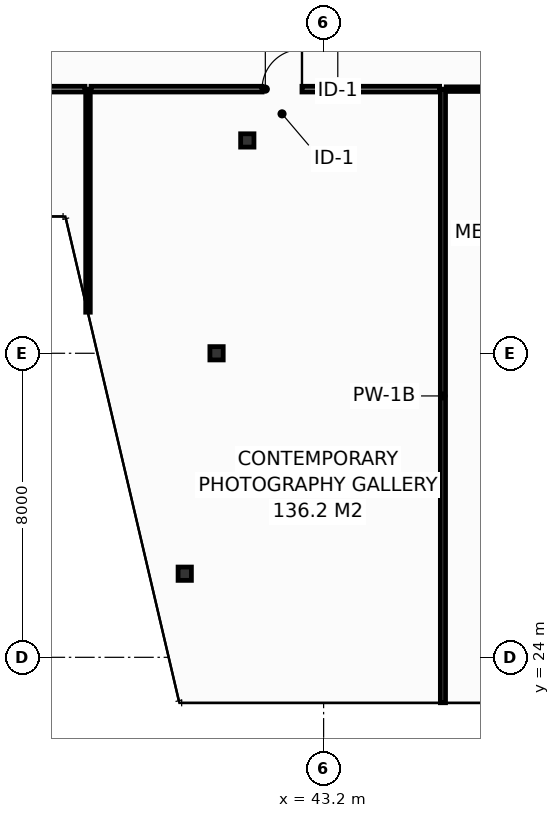
"""IFC4 building model, lengths in metres.
Left out: names, types, materials, properties, quantities, classifications, styles, units other than length and angle.
Written with IfcOpenShell. Run it as: python <this file> out.ifc"""

import sys

from ifc_helpers import new_model, si_unit, direction, frame, frame_2d, origin, origin_2d, place, context, subcontext, project, spatial, rectangle, hollow_rectangle, extrude, element, fill, save


model = new_model("IFC4")
c1 = context("Model", 3, precision=1e-05, world=origin(), true_north=direction((0.0, 1.0)))
c2 = subcontext(c1, "Body", "Model", "MODEL_VIEW")
j1 = project(units=[si_unit("LENGTHUNIT", "METRE"), si_unit("PLANEANGLEUNIT", "RADIAN")], contexts=[c1])
p1 = place(None, origin())
s1 = spatial("IfcSite", under=j1, at=p1, CompositionType="ELEMENT")
p2 = place(p1, origin())
s2 = spatial("IfcBuilding", under=s1, at=p2, CompositionType="ELEMENT")
p3 = place(p2, frame((0.0, 0.0, 268.6)))
s3 = spatial("IfcBuildingStorey", under=s2, at=p3, CompositionType="ELEMENT", Elevation=268.6)
for number, where, z_axis, x_axis in (
    (1, (39.546, 26.2, 0.0), (0.0, 0.0, 1.0), (1.0, 0.0, 0.0)),
    (2, (40.383, 32.0, 0.0), (0.0, 0.0, 1.0), (1.0, 0.0, 0.0)),
    (3, (41.192, 37.6, 0.0), (0.0, 0.0, 1.0), (1.0, 0.0, 0.0)),
):
    element("IfcColumn", number, at=place(p3, frame(where, z_axis=z_axis, x_axis=x_axis)), inside=s3, PredefinedType="COLUMN", context=c2, shape_type="SweptSolid", body=[
        extrude(hollow_rectangle(XDim=0.35, YDim=0.35, WallThickness=0.016, at=origin_2d()), origin(), (0.0, 0.0, 1.0), 3.8),
    ])
p4 = place(p3, frame((37.0, 33.081, 0.0), z_axis=(0.0, 0.0, 1.0), x_axis=(0.0, 1.0, 0.0)))
e4 = element("IfcWall", 4, at=p4, inside=s3, PredefinedType="PARTITIONING", context=c2, shape_type="SweptSolid", body=[
    extrude(rectangle(XDim=5.869, YDim=0.12, at=frame_2d((2.935, 0.0))), origin(), (0.0, 0.0, 1.0), 3.55),
])
p5 = place(p3, frame((46.34, 22.805, 0.0), z_axis=(0.0, 0.0, 1.0), x_axis=(0.0, 1.0, 0.0)))
e5 = element("IfcWall", 5, at=p5, inside=s3, PredefinedType="PARTITIONING", context=c2, shape_type="SweptSolid", body=[
    extrude(rectangle(XDim=16.145, YDim=0.135, at=frame_2d((8.073, 0.0))), origin(), (0.0, 0.0, 1.0), 2.947),
])
p6 = place(p3, frame((27.758, 38.95, 0.0), z_axis=(0.0, 0.0, 1.0), x_axis=(1.0, 0.0, 0.0)))
e6 = element("IfcWall", 6, at=p6, inside=s3, PredefinedType="PARTITIONING", context=c2, shape_type="SweptSolid", body=[
    extrude(rectangle(XDim=9.162, YDim=0.15, at=frame_2d((4.581, 0.0))), origin(), (0.0, 0.0, 1.0), 3.55),
])
p7 = place(p6, frame((4.056, 0.0, 0.0)))
e7 = element("IfcOpeningElement", 7, at=p7, cuts=e6, PredefinedType="OPENING", context=c2, shape_type="SweptSolid", body=[
    extrude(rectangle(XDim=1.05, YDim=2.15, at=frame_2d((0.525, 1.075))), frame((0.0, 0.085, 0.0), z_axis=(0.0, -1.0, 0.0), x_axis=(1.0, 0.0, 0.0)), (0.0, 0.0, 1.0), 0.17),
])
p8 = place(p3, frame((37.08, 38.95, 0.0), z_axis=(0.0, 0.0, 1.0), x_axis=(1.0, 0.0, 0.0)))
e8 = element("IfcWall", 8, at=p8, inside=s3, PredefinedType="PARTITIONING", context=c2, shape_type="SweptSolid", body=[
    extrude(rectangle(XDim=9.172, YDim=0.15, at=frame_2d((4.586, 0.0))), origin(), (0.0, 0.0, 1.0), 2.947),
])
p9 = place(p8, frame((4.501, 0.0, 0.0)))
e9 = element("IfcOpeningElement", 9, at=p9, cuts=e8, PredefinedType="OPENING", context=c2, shape_type="SweptSolid", body=[
    extrude(rectangle(XDim=1.05, YDim=2.15, at=frame_2d((0.525, 1.075))), frame((0.0, 0.085, 0.0), z_axis=(0.0, -1.0, 0.0), x_axis=(1.0, 0.0, 0.0)), (0.0, 0.0, 1.0), 0.17),
])
p10 = place(p3, frame((46.427, 38.95, 0.0), z_axis=(0.0, 0.0, 1.0), x_axis=(1.0, 0.0, 0.0)))
e10 = element("IfcWall", 10, at=p10, inside=s3, PredefinedType="PARTITIONING", context=c2, shape_type="SweptSolid", body=[
    extrude(rectangle(XDim=7.089, YDim=0.12, at=frame_2d((3.544, 0.0))), origin(), (0.0, 0.0, 1.0), 3.085),
])
p11 = place(p10, frame((3.095, 0.0, 0.0)))
e11 = element("IfcOpeningElement", 11, at=p11, cuts=e10, PredefinedType="OPENING", context=c2, shape_type="SweptSolid", body=[
    extrude(rectangle(XDim=0.9, YDim=2.1, at=frame_2d((0.45, 1.05))), frame((0.0, 0.07, 0.0), z_axis=(0.0, -1.0, 0.0), x_axis=(1.0, 0.0, 0.0)), (0.0, 0.0, 1.0), 0.14),
])
p12 = place(p9, origin())
e12 = element("IfcDoor", 12, at=p12, inside=s3, OperationType="SINGLE_SWING_RIGHT", PredefinedType="DOOR", context=c2, shape_type="SweptSolid", body=[
    extrude(rectangle(XDim=1.05, YDim=2.15, at=frame_2d((0.525, 1.075))), frame((0.0, 0.025, 0.0), z_axis=(0.0, -1.0, 0.0), x_axis=(1.0, 0.0, 0.0)), (0.0, 0.0, 1.0), 0.05),
])
fill(e9, e12)
save(model, sys.argv[1])
